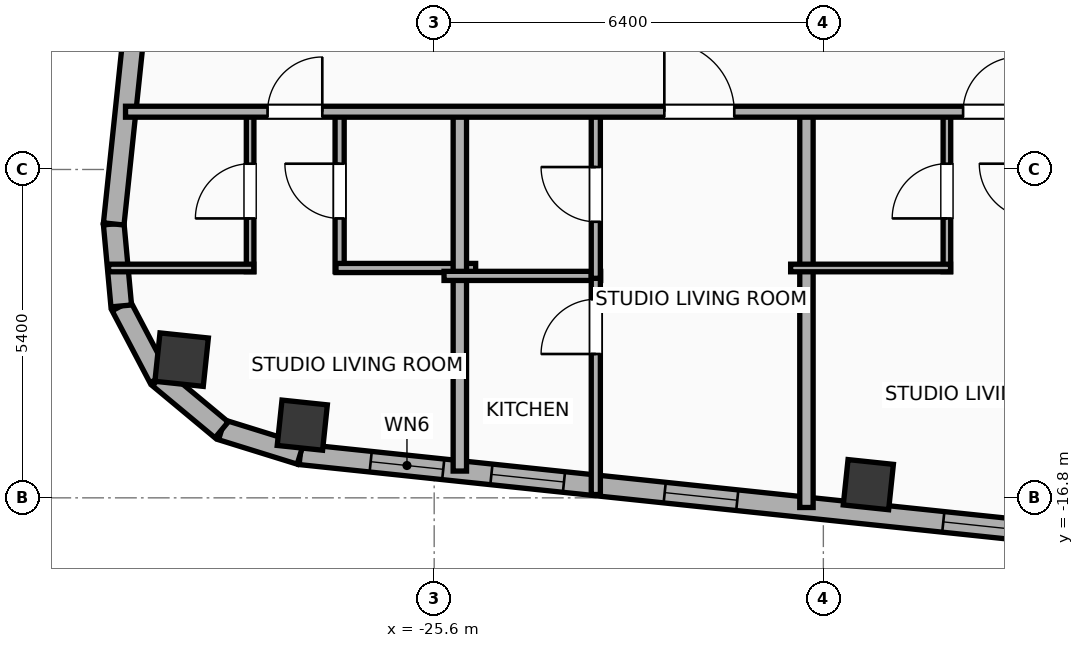
"""IFC4 building model, lengths in metres.
Left out: names, types, materials, properties, quantities, classifications, styles, units other than length and angle.
Written with IfcOpenShell. Run it as: python <this file> out.ifc"""

import sys

from ifc_helpers import new_model, si_unit, direction, frame, frame_2d, origin, origin_2d, place, context, subcontext, project, spatial, rectangle, hollow_rectangle, hollow_circle, extrude, element, fill, save


model = new_model("IFC4")
c1 = context("Model", 3, precision=1e-05, world=origin(), true_north=direction((0.0, 1.0)))
c2 = subcontext(c1, "Body", "Model", "MODEL_VIEW")
j1 = project(units=[si_unit("LENGTHUNIT", "METRE"), si_unit("PLANEANGLEUNIT", "RADIAN")], contexts=[c1])
p1 = place(None, origin())
s1 = spatial("IfcSite", under=j1, at=p1, CompositionType="ELEMENT")
p2 = place(p1, origin())
s2 = spatial("IfcBuilding", under=s1, at=p2, CompositionType="ELEMENT")
p3 = place(p2, frame((0.0, 0.0, 302.9)))
s3 = spatial("IfcBuildingStorey", under=s2, at=p3, CompositionType="ELEMENT", Elevation=302.9)
for number, where, z_axis, x_axis in (
    (1, (-27.769, -15.604, 0.0), (0.0, 0.0, 1.0), (0.995, -0.105, 0.0)),
    (2, (-18.46, -16.583, 0.0), (0.0, 0.0, 1.0), (0.995, -0.105, 0.0)),
):
    element("IfcColumn", number, at=place(p3, frame(where, z_axis=z_axis, x_axis=x_axis)), inside=s3, PredefinedType="COLUMN", context=c2, shape_type="SweptSolid", body=[
        extrude(hollow_rectangle(XDim=0.75, YDim=0.75, WallThickness=0.025, at=origin_2d()), origin(), (0.0, 0.0, 1.0), 3.9),
    ])
p4 = place(p3, frame((-29.753, -14.527, 0.0), z_axis=(0.0, 0.0, 1.0), x_axis=(0.994521895368, -0.104528463268, 0.0)))
e3 = element("IfcColumn", 3, at=p4, inside=s3, PredefinedType="COLUMN", context=c2, shape_type="SweptSolid", body=[
    extrude(hollow_circle(Radius=0.4, WallThickness=0.028, at=origin_2d()), origin(), (0.0, 0.0, 1.0), 3.9),
])
p5 = place(p3, frame((18.708, -20.972, 0.0), z_axis=(0.0, 0.0, 1.0), x_axis=(-0.994521888554, 0.104528528102, 0.0)))
e4 = element("IfcWall", 4, at=p5, inside=s3, PredefinedType="ELEMENTEDWALL", context=c2, shape_type="SweptSolid", body=[
    extrude(rectangle(XDim=46.766, YDim=0.34, at=frame_2d((23.383, 0.0))), origin(), (0.0, 0.0, 1.0), 3.635),
])
p6 = place(p5, frame((23.733, 0.0, 0.65)))
e5 = element("IfcOpeningElement", 5, at=p6, cuts=e4, PredefinedType="OPENING", context=c2, shape_type="SweptSolid", body=[
    extrude(rectangle(XDim=2.6, YDim=2.45, at=frame_2d((1.3, 1.225))), frame((0.0, 0.18, 0.0), z_axis=(0.0, -1.0, 0.0), x_axis=(1.0, 0.0, 0.0)), (0.0, 0.0, 1.0), 0.36),
])
p7 = place(p5, frame((44.402, 0.0, 0.75)))
e6 = element("IfcOpeningElement", 6, at=p7, cuts=e4, PredefinedType="OPENING", context=c2, shape_type="SweptSolid", body=[
    extrude(rectangle(XDim=1.2, YDim=2.05, at=frame_2d((0.6, 1.025))), frame((0.0, 0.18, 0.0), z_axis=(0.0, -1.0, 0.0), x_axis=(1.0, 0.0, 0.0)), (0.0, 0.0, 1.0), 0.36),
])
p8 = place(p5, frame((39.54, 0.0, 0.75)))
e7 = element("IfcOpeningElement", 7, at=p8, cuts=e4, PredefinedType="OPENING", context=c2, shape_type="SweptSolid", body=[
    extrude(rectangle(XDim=1.2, YDim=2.05, at=frame_2d((0.6, 1.025))), frame((0.0, 0.18, 0.0), z_axis=(0.0, -1.0, 0.0), x_axis=(1.0, 0.0, 0.0)), (0.0, 0.0, 1.0), 0.36),
])
p9 = place(p5, frame((42.406, 0.0, 0.75)))
e8 = element("IfcOpeningElement", 8, at=p9, cuts=e4, PredefinedType="OPENING", context=c2, shape_type="SweptSolid", body=[
    extrude(rectangle(XDim=1.2, YDim=2.05, at=frame_2d((0.6, 1.025))), frame((0.0, 0.18, 0.0), z_axis=(0.0, -1.0, 0.0), x_axis=(1.0, 0.0, 0.0)), (0.0, 0.0, 1.0), 0.36),
])
p10 = place(p5, frame((34.933, 0.0, 0.75)))
e9 = element("IfcOpeningElement", 9, at=p10, cuts=e4, PredefinedType="OPENING", context=c2, shape_type="SweptSolid", body=[
    extrude(rectangle(XDim=1.2, YDim=2.05, at=frame_2d((0.6, 1.025))), frame((0.0, 0.18, 0.0), z_axis=(0.0, -1.0, 0.0), x_axis=(1.0, 0.0, 0.0)), (0.0, 0.0, 1.0), 0.36),
])
p11 = place(p5, frame((28.631, 0.0, 0.75)))
e10 = element("IfcOpeningElement", 10, at=p11, cuts=e4, PredefinedType="OPENING", context=c2, shape_type="SweptSolid", body=[
    extrude(rectangle(XDim=1.2, YDim=2.05, at=frame_2d((0.6, 1.025))), frame((0.0, 0.18, 0.0), z_axis=(0.0, -1.0, 0.0), x_axis=(1.0, 0.0, 0.0)), (0.0, 0.0, 1.0), 0.36),
])
p12 = place(p5, frame((30.896, 0.0, 0.75)))
e11 = element("IfcOpeningElement", 11, at=p12, cuts=e4, PredefinedType="OPENING", context=c2, shape_type="SweptSolid", body=[
    extrude(rectangle(XDim=1.2, YDim=2.05, at=frame_2d((0.6, 1.025))), frame((0.0, 0.18, 0.0), z_axis=(0.0, -1.0, 0.0), x_axis=(1.0, 0.0, 0.0)), (0.0, 0.0, 1.0), 0.36),
])
p13 = place(p5, frame((7.501, 0.0, 0.75)))
e12 = element("IfcOpeningElement", 12, at=p13, cuts=e4, PredefinedType="OPENING", context=c2, shape_type="SweptSolid", body=[
    extrude(rectangle(XDim=1.2, YDim=2.05, at=frame_2d((0.6, 1.025))), frame((0.0, 0.18, 0.0), z_axis=(0.0, -1.0, 0.0), x_axis=(1.0, 0.0, 0.0)), (0.0, 0.0, 1.0), 0.36),
])
p14 = place(p5, frame((4.159, 0.0, 0.75)))
e13 = element("IfcOpeningElement", 13, at=p14, cuts=e4, PredefinedType="OPENING", context=c2, shape_type="SweptSolid", body=[
    extrude(rectangle(XDim=1.2, YDim=2.05, at=frame_2d((0.6, 1.025))), frame((0.0, 0.18, 0.0), z_axis=(0.0, -1.0, 0.0), x_axis=(1.0, 0.0, 0.0)), (0.0, 0.0, 1.0), 0.36),
])
p15 = place(p5, frame((1.369, 0.0, 0.75)))
e14 = element("IfcOpeningElement", 14, at=p15, cuts=e4, PredefinedType="OPENING", context=c2, shape_type="SweptSolid", body=[
    extrude(rectangle(XDim=1.2, YDim=2.05, at=frame_2d((0.6, 1.025))), frame((0.0, 0.18, 0.0), z_axis=(0.0, -1.0, 0.0), x_axis=(1.0, 0.0, 0.0)), (0.0, 0.0, 1.0), 0.36),
])
p16 = place(p5, frame((20.254, 0.0, 0.75)))
e15 = element("IfcOpeningElement", 15, at=p16, cuts=e4, PredefinedType="OPENING", context=c2, shape_type="SweptSolid", body=[
    extrude(rectangle(XDim=1.2, YDim=2.05, at=frame_2d((0.6, 1.025))), frame((0.0, 0.18, 0.0), z_axis=(0.0, -1.0, 0.0), x_axis=(1.0, 0.0, 0.0)), (0.0, 0.0, 1.0), 0.36),
])
p17 = place(p5, frame((16.172, 0.0, 0.75)))
e16 = element("IfcOpeningElement", 16, at=p17, cuts=e4, PredefinedType="OPENING", context=c2, shape_type="SweptSolid", body=[
    extrude(rectangle(XDim=1.2, YDim=2.05, at=frame_2d((0.6, 1.025))), frame((0.0, 0.18, 0.0), z_axis=(0.0, -1.0, 0.0), x_axis=(1.0, 0.0, 0.0)), (0.0, 0.0, 1.0), 0.36),
])
p18 = place(p5, frame((12.11, 0.0, 0.75)))
e17 = element("IfcOpeningElement", 17, at=p18, cuts=e4, PredefinedType="OPENING", context=c2, shape_type="SweptSolid", body=[
    extrude(rectangle(XDim=1.2, YDim=2.05, at=frame_2d((0.6, 1.025))), frame((0.0, 0.18, 0.0), z_axis=(0.0, -1.0, 0.0), x_axis=(1.0, 0.0, 0.0)), (0.0, 0.0, 1.0), 0.36),
])
p19 = place(p3, frame((-27.802, -16.084, 0.0), z_axis=(0.0, 0.0, 1.0), x_axis=(-0.955007802701, 0.296580674994, 0.0)))
e18 = element("IfcWall", 18, at=p19, inside=s3, PredefinedType="ELEMENTEDWALL", context=c2, shape_type="SweptSolid", body=[
    extrude(rectangle(XDim=1.354, YDim=0.34, at=frame_2d((0.677, 0.0))), origin(), (0.0, 0.0, 1.0), 3.635),
])
p20 = place(p3, frame((-29.096, -15.682, 0.0), z_axis=(0.0, 0.0, 1.0), x_axis=(-0.768864427906, 0.639411832469, 0.0)))
e19 = element("IfcWall", 19, at=p20, inside=s3, PredefinedType="ELEMENTEDWALL", context=c2, shape_type="SweptSolid", body=[
    extrude(rectangle(XDim=1.337, YDim=0.34, at=frame_2d((0.668, 0.0))), origin(), (0.0, 0.0, 1.0), 3.635),
])
p21 = place(p3, frame((-30.124, -14.827, 0.0), z_axis=(0.0, 0.0, 1.0), x_axis=(-0.465528132217, 0.885033083062, 0.0)))
e20 = element("IfcWall", 20, at=p21, inside=s3, PredefinedType="ELEMENTEDWALL", context=c2, shape_type="SweptSolid", body=[
    extrude(rectangle(XDim=1.337, YDim=0.34, at=frame_2d((0.668, 0.0))), origin(), (0.0, 0.0, 1.0), 3.635),
])
p22 = place(p3, frame((-30.746, -13.644, 0.0), z_axis=(0.0, 0.0, 1.0), x_axis=(-0.091592370975, 0.995796584438, 0.0)))
e21 = element("IfcWall", 21, at=p22, inside=s3, PredefinedType="ELEMENTEDWALL", context=c2, shape_type="SweptSolid", body=[
    extrude(rectangle(XDim=1.354, YDim=0.34, at=frame_2d((0.677, 0.0))), origin(), (0.0, 0.0, 1.0), 3.635),
])
p23 = place(p3, frame((-30.87, -12.296, 0.0), z_axis=(0.0, 0.0, 1.0), x_axis=(0.104533282919, 0.994521388791, 0.0)))
e22 = element("IfcWall", 22, at=p23, inside=s3, PredefinedType="ELEMENTEDWALL", context=c2, shape_type="SweptSolid", body=[
    extrude(rectangle(XDim=30.366, YDim=0.34, at=frame_2d((15.183, 0.0))), origin(), (0.0, 0.0, 1.0), 3.635),
])
p24 = place(p23, frame((5.442, 0.0, 0.65)))
e23 = element("IfcOpeningElement", 23, at=p24, cuts=e22, PredefinedType="OPENING", context=c2, shape_type="SweptSolid", body=[
    extrude(rectangle(XDim=2.6, YDim=2.45, at=frame_2d((1.3, 1.225))), frame((0.0, 0.18, 0.0), z_axis=(0.0, -1.0, 0.0), x_axis=(1.0, 0.0, 0.0)), (0.0, 0.0, 1.0), 0.36),
])
p25 = place(p23, frame((26.861, 0.0, 0.75)))
e24 = element("IfcOpeningElement", 24, at=p25, cuts=e22, PredefinedType="OPENING", context=c2, shape_type="SweptSolid", body=[
    extrude(rectangle(XDim=1.2, YDim=2.05, at=frame_2d((0.6, 1.025))), frame((0.0, 0.18, 0.0), z_axis=(0.0, -1.0, 0.0), x_axis=(1.0, 0.0, 0.0)), (0.0, 0.0, 1.0), 0.36),
])
p26 = place(p23, frame((16.311, 0.0, 0.75)))
e25 = element("IfcOpeningElement", 25, at=p26, cuts=e22, PredefinedType="OPENING", context=c2, shape_type="SweptSolid", body=[
    extrude(rectangle(XDim=1.2, YDim=2.05, at=frame_2d((0.6, 1.025))), frame((0.0, 0.18, 0.0), z_axis=(0.0, -1.0, 0.0), x_axis=(1.0, 0.0, 0.0)), (0.0, 0.0, 1.0), 0.36),
])
p27 = place(p3, frame((-28.627, -13.08, 0.0), z_axis=(0.0, 0.0, 1.0), x_axis=(0.0, 1.0, 0.0)))
e26 = element("IfcWall", 26, at=p27, inside=s3, PredefinedType="PARTITIONING", context=c2, shape_type="SweptSolid", body=[
    extrude(rectangle(XDim=2.65, YDim=0.125, at=frame_2d((1.325, 0.0))), origin(), (0.0, 0.0, 1.0), 3.635),
])
p28 = place(p27, frame((0.875, 0.0, 0.0)))
e27 = element("IfcOpeningElement", 27, at=p28, cuts=e26, PredefinedType="OPENING", context=c2, shape_type="SweptSolid", body=[
    extrude(rectangle(XDim=0.9, YDim=2.05, at=frame_2d((0.45, 1.025))), frame((0.0, 0.073, 0.0), z_axis=(0.0, -1.0, 0.0), x_axis=(1.0, 0.0, 0.0)), (0.0, 0.0, 1.0), 0.145),
])
p29 = place(p3, frame((-27.155, -13.08, 0.0), z_axis=(0.0, 0.0, 1.0), x_axis=(0.0, 1.0, 0.0)))
e28 = element("IfcWall", 28, at=p29, inside=s3, PredefinedType="PLUMBINGWALL", context=c2, shape_type="SweptSolid", body=[
    extrude(rectangle(XDim=2.65, YDim=0.15, at=frame_2d((1.325, 0.0))), origin(), (0.0, 0.0, 1.0), 3.635),
])
p30 = place(p29, frame((0.875, 0.0, 0.0)))
e29 = element("IfcOpeningElement", 29, at=p30, cuts=e28, PredefinedType="OPENING", context=c2, shape_type="SweptSolid", body=[
    extrude(rectangle(XDim=0.9, YDim=2.05, at=frame_2d((0.45, 1.025))), frame((0.0, 0.085, 0.0), z_axis=(0.0, -1.0, 0.0), x_axis=(1.0, 0.0, 0.0)), (0.0, 0.0, 1.0), 0.17),
])
p31 = place(p3, frame((-30.954, -13.02, 0.0), z_axis=(0.0, 0.0, 1.0), x_axis=(1.0, 0.0, 0.0)))
e30 = element("IfcWall", 30, at=p31, inside=s3, PredefinedType="PARTITIONING", context=c2, shape_type="SweptSolid", body=[
    extrude(rectangle(XDim=2.387, YDim=0.125, at=frame_2d((1.194, 0.0))), origin(), (0.0, 0.0, 1.0), 3.635),
])
p32 = place(p3, frame((-27.215, -13.02, 0.0), z_axis=(0.0, 0.0, 1.0), x_axis=(1.0, 0.0, 0.0)))
e31 = element("IfcWall", 31, at=p32, inside=s3, PredefinedType="PLUMBINGWALL", context=c2, shape_type="SweptSolid", body=[
    extrude(rectangle(XDim=2.297, YDim=0.15, at=frame_2d((1.148, 0.0))), origin(), (0.0, 0.0, 1.0), 3.635),
])
p33 = place(p3, frame((-25.178, -16.36, 0.0), z_axis=(0.0, 0.0, 1.0), x_axis=(0.0, 1.0, 0.0)))
e32 = element("IfcWall", 32, at=p33, inside=s3, PredefinedType="PARTITIONING", context=c2, shape_type="SweptSolid", body=[
    extrude(rectangle(XDim=5.99, YDim=0.22, at=frame_2d((2.995, 0.0))), origin(), (0.0, 0.0, 1.0), 3.635),
])
p34 = place(p3, frame((-25.438, -13.15, 0.0), z_axis=(0.0, 0.0, 1.0), x_axis=(1.0, 0.0, 0.0)))
e33 = element("IfcWall", 33, at=p34, inside=s3, PredefinedType="PLUMBINGWALL", context=c2, shape_type="SweptSolid", body=[
    extrude(rectangle(XDim=2.576, YDim=0.15, at=frame_2d((1.288, 0.0))), origin(), (0.0, 0.0, 1.0), 3.635),
])
p35 = place(p3, frame((-22.942, -16.745, 0.0), z_axis=(0.0, 0.0, 1.0), x_axis=(0.0, 1.0, 0.0)))
e34 = element("IfcWall", 34, at=p35, inside=s3, PredefinedType="PLUMBINGWALL", context=c2, shape_type="SweptSolid", body=[
    extrude(rectangle(XDim=3.635, YDim=0.15, at=frame_2d((1.818, 0.0))), origin(), (0.0, 0.0, 1.0), 3.635),
])
p36 = place(p35, frame((2.311, 0.0, 0.0)))
e35 = element("IfcOpeningElement", 35, at=p36, cuts=e34, PredefinedType="OPENING", context=c2, shape_type="SweptSolid", body=[
    extrude(rectangle(XDim=0.9, YDim=2.05, at=frame_2d((0.45, 1.025))), frame((0.0, 0.085, 0.0), z_axis=(0.0, -1.0, 0.0), x_axis=(1.0, 0.0, 0.0)), (0.0, 0.0, 1.0), 0.17),
])
p37 = place(p3, frame((-22.942, -13.19, 0.0), z_axis=(0.0, 0.0, 1.0), x_axis=(0.0, 1.0, 0.0)))
e36 = element("IfcWall", 36, at=p37, inside=s3, PredefinedType="PLUMBINGWALL", context=c2, shape_type="SweptSolid", body=[
    extrude(rectangle(XDim=2.76, YDim=0.15, at=frame_2d((1.38, 0.0))), origin(), (0.0, 0.0, 1.0), 3.635),
])
p38 = place(p37, frame((0.93, 0.0, 0.0)))
e37 = element("IfcOpeningElement", 37, at=p38, cuts=e36, PredefinedType="OPENING", context=c2, shape_type="SweptSolid", body=[
    extrude(rectangle(XDim=0.9, YDim=2.05, at=frame_2d((0.45, 1.025))), frame((0.0, 0.085, 0.0), z_axis=(0.0, -1.0, 0.0), x_axis=(1.0, 0.0, 0.0)), (0.0, 0.0, 1.0), 0.17),
])
p39 = place(p3, frame((-19.478, -16.959, 0.0), z_axis=(0.0, 0.0, 1.0), x_axis=(0.0, 1.0, 0.0)))
e38 = element("IfcWall", 38, at=p39, inside=s3, PredefinedType="PARTITIONING", context=c2, shape_type="SweptSolid", body=[
    extrude(rectangle(XDim=6.589, YDim=0.22, at=frame_2d((3.294, 0.0))), origin(), (0.0, 0.0, 1.0), 3.635),
])
p40 = place(p3, frame((-17.168, -13.08, 0.0), z_axis=(0.0, 0.0, 1.0), x_axis=(0.0, 1.0, 0.0)))
e39 = element("IfcWall", 39, at=p40, inside=s3, PredefinedType="PARTITIONING", context=c2, shape_type="SweptSolid", body=[
    extrude(rectangle(XDim=2.65, YDim=0.125, at=frame_2d((1.325, 0.0))), origin(), (0.0, 0.0, 1.0), 3.635),
])
p41 = place(p40, frame((0.875, 0.0, 0.0)))
e40 = element("IfcOpeningElement", 40, at=p41, cuts=e39, PredefinedType="OPENING", context=c2, shape_type="SweptSolid", body=[
    extrude(rectangle(XDim=0.9, YDim=2.05, at=frame_2d((0.45, 1.025))), frame((0.0, 0.073, 0.0), z_axis=(0.0, -1.0, 0.0), x_axis=(1.0, 0.0, 0.0)), (0.0, 0.0, 1.0), 0.145),
])
p42 = place(p3, frame((-19.738, -13.02, 0.0), z_axis=(0.0, 0.0, 1.0), x_axis=(1.0, 0.0, 0.0)))
e41 = element("IfcWall", 41, at=p42, inside=s3, PredefinedType="PARTITIONING", context=c2, shape_type="SweptSolid", body=[
    extrude(rectangle(XDim=2.63, YDim=0.125, at=frame_2d((1.315, 0.0))), origin(), (0.0, 0.0, 1.0), 3.635),
])
p43 = place(p3, frame((-30.676, -10.45, 0.0), z_axis=(0.0, 0.0, 1.0), x_axis=(1.0, 0.0, 0.0)))
e42 = element("IfcWall", 42, at=p43, inside=s3, PredefinedType="PARTITIONING", context=c2, shape_type="SweptSolid", body=[
    extrude(rectangle(XDim=22.596, YDim=0.18, at=frame_2d((11.298, 0.0))), origin(), (0.0, 0.0, 1.0), 3.635),
])
p44 = place(p43, frame((2.336, 0.0, 0.0)))
e43 = element("IfcOpeningElement", 43, at=p44, cuts=e42, PredefinedType="OPENING", context=c2, shape_type="SweptSolid", body=[
    extrude(rectangle(XDim=0.9, YDim=2.05, at=frame_2d((0.45, 1.025))), frame((0.0, 0.1, 0.0), z_axis=(0.0, -1.0, 0.0), x_axis=(1.0, 0.0, 0.0)), (0.0, 0.0, 1.0), 0.2),
])
p45 = place(p43, frame((8.861, 0.0, 0.0)))
e44 = element("IfcOpeningElement", 44, at=p45, cuts=e42, PredefinedType="OPENING", context=c2, shape_type="SweptSolid", body=[
    extrude(rectangle(XDim=1.15, YDim=2.05, at=frame_2d((0.575, 1.025))), frame((0.0, 0.1, 0.0), z_axis=(0.0, -1.0, 0.0), x_axis=(1.0, 0.0, 0.0)), (0.0, 0.0, 1.0), 0.2),
])
p46 = place(p43, frame((13.774, 0.0, 0.0)))
e45 = element("IfcOpeningElement", 45, at=p46, cuts=e42, PredefinedType="OPENING", context=c2, shape_type="SweptSolid", body=[
    extrude(rectangle(XDim=0.9, YDim=2.05, at=frame_2d((0.45, 1.025))), frame((0.0, 0.1, 0.0), z_axis=(0.0, -1.0, 0.0), x_axis=(1.0, 0.0, 0.0)), (0.0, 0.0, 1.0), 0.2),
])
p47 = place(p43, frame((20.306, 0.0, 0.0)))
e46 = element("IfcOpeningElement", 46, at=p47, cuts=e42, PredefinedType="OPENING", context=c2, shape_type="SweptSolid", body=[
    extrude(rectangle(XDim=1.15, YDim=2.05, at=frame_2d((0.575, 1.025))), frame((0.0, 0.1, 0.0), z_axis=(0.0, -1.0, 0.0), x_axis=(1.0, 0.0, 0.0)), (0.0, 0.0, 1.0), 0.2),
])
p48 = place(p7, origin())
e47 = element("IfcWindow", 47, at=p48, inside=s3, PartitioningType="SINGLE_PANEL", PredefinedType="WINDOW", context=c2, shape_type="SweptSolid", body=[
    extrude(rectangle(XDim=1.2, YDim=2.05, at=frame_2d((0.6, 1.025))), frame((0.0, 0.03, 0.0), z_axis=(0.0, -1.0, 0.0), x_axis=(1.0, 0.0, 0.0)), (0.0, 0.0, 1.0), 0.06),
])
fill(e6, e47)
p49 = place(p8, origin())
e48 = element("IfcWindow", 48, at=p49, inside=s3, PartitioningType="SINGLE_PANEL", PredefinedType="WINDOW", context=c2, shape_type="SweptSolid", body=[
    extrude(rectangle(XDim=1.2, YDim=2.05, at=frame_2d((0.6, 1.025))), frame((0.0, 0.03, 0.0), z_axis=(0.0, -1.0, 0.0), x_axis=(1.0, 0.0, 0.0)), (0.0, 0.0, 1.0), 0.06),
])
fill(e7, e48)
p50 = place(p9, origin())
e49 = element("IfcWindow", 49, at=p50, inside=s3, PartitioningType="SINGLE_PANEL", PredefinedType="WINDOW", context=c2, shape_type="SweptSolid", body=[
    extrude(rectangle(XDim=1.2, YDim=2.05, at=frame_2d((0.6, 1.025))), frame((0.0, 0.03, 0.0), z_axis=(0.0, -1.0, 0.0), x_axis=(1.0, 0.0, 0.0)), (0.0, 0.0, 1.0), 0.06),
])
fill(e8, e49)
p51 = place(p10, origin())
e50 = element("IfcWindow", 50, at=p51, inside=s3, PartitioningType="SINGLE_PANEL", PredefinedType="WINDOW", context=c2, shape_type="SweptSolid", body=[
    extrude(rectangle(XDim=1.2, YDim=2.05, at=frame_2d((0.6, 1.025))), frame((0.0, 0.03, 0.0), z_axis=(0.0, -1.0, 0.0), x_axis=(1.0, 0.0, 0.0)), (0.0, 0.0, 1.0), 0.06),
])
fill(e9, e50)
p52 = place(p28, origin())
e51 = element("IfcDoor", 51, at=p52, inside=s3, OperationType="SINGLE_SWING_LEFT", PredefinedType="DOOR", context=c2, shape_type="SweptSolid", body=[
    extrude(rectangle(XDim=0.9, YDim=2.05, at=frame_2d((0.45, 1.025))), frame((0.0, 0.025, 0.0), z_axis=(0.0, -1.0, 0.0), x_axis=(1.0, 0.0, 0.0)), (0.0, 0.0, 1.0), 0.05),
])
fill(e27, e51)
p53 = place(p30, origin())
e52 = element("IfcDoor", 52, at=p53, inside=s3, OperationType="SINGLE_SWING_RIGHT", PredefinedType="DOOR", context=c2, shape_type="SweptSolid", body=[
    extrude(rectangle(XDim=0.9, YDim=2.05, at=frame_2d((0.45, 1.025))), frame((0.0, 0.025, 0.0), z_axis=(0.0, -1.0, 0.0), x_axis=(1.0, 0.0, 0.0)), (0.0, 0.0, 1.0), 0.05),
])
fill(e29, e52)
p54 = place(p36, origin())
e53 = element("IfcDoor", 53, at=p54, inside=s3, OperationType="SINGLE_SWING_LEFT", PredefinedType="DOOR", context=c2, shape_type="SweptSolid", body=[
    extrude(rectangle(XDim=0.9, YDim=2.05, at=frame_2d((0.45, 1.025))), frame((0.0, 0.025, 0.0), z_axis=(0.0, -1.0, 0.0), x_axis=(1.0, 0.0, 0.0)), (0.0, 0.0, 1.0), 0.05),
])
fill(e35, e53)
p55 = place(p38, origin())
e54 = element("IfcDoor", 54, at=p55, inside=s3, OperationType="SINGLE_SWING_RIGHT", PredefinedType="DOOR", context=c2, shape_type="SweptSolid", body=[
    extrude(rectangle(XDim=0.9, YDim=2.05, at=frame_2d((0.45, 1.025))), frame((0.0, 0.025, 0.0), z_axis=(0.0, -1.0, 0.0), x_axis=(1.0, 0.0, 0.0)), (0.0, 0.0, 1.0), 0.05),
])
fill(e37, e54)
p56 = place(p41, origin())
e55 = element("IfcDoor", 55, at=p56, inside=s3, OperationType="SINGLE_SWING_LEFT", PredefinedType="DOOR", context=c2, shape_type="SweptSolid", body=[
    extrude(rectangle(XDim=0.9, YDim=2.05, at=frame_2d((0.45, 1.025))), frame((0.0, 0.025, 0.0), z_axis=(0.0, -1.0, 0.0), x_axis=(1.0, 0.0, 0.0)), (0.0, 0.0, 1.0), 0.05),
])
fill(e40, e55)
p57 = place(p44, origin())
e56 = element("IfcDoor", 56, at=p57, inside=s3, OperationType="SINGLE_SWING_RIGHT", PredefinedType="DOOR", context=c2, shape_type="SweptSolid", body=[
    extrude(rectangle(XDim=0.9, YDim=2.05, at=frame_2d((0.45, 1.025))), frame((0.0, 0.025, 0.0), z_axis=(0.0, -1.0, 0.0), x_axis=(1.0, 0.0, 0.0)), (0.0, 0.0, 1.0), 0.05),
])
fill(e43, e56)
p58 = place(p45, origin())
e57 = element("IfcDoor", 57, at=p58, inside=s3, OperationType="SINGLE_SWING_LEFT", PredefinedType="DOOR", context=c2, shape_type="SweptSolid", body=[
    extrude(rectangle(XDim=1.15, YDim=2.05, at=frame_2d((0.575, 1.025))), frame((0.0, 0.025, 0.0), z_axis=(0.0, -1.0, 0.0), x_axis=(1.0, 0.0, 0.0)), (0.0, 0.0, 1.0), 0.05),
])
fill(e44, e57)
p59 = place(p46, origin())
e58 = element("IfcDoor", 58, at=p59, inside=s3, OperationType="SINGLE_SWING_RIGHT", PredefinedType="DOOR", context=c2, shape_type="SweptSolid", body=[
    extrude(rectangle(XDim=0.9, YDim=2.05, at=frame_2d((0.45, 1.025))), frame((0.0, 0.025, 0.0), z_axis=(0.0, -1.0, 0.0), x_axis=(1.0, 0.0, 0.0)), (0.0, 0.0, 1.0), 0.05),
])
fill(e45, e58)
save(model, sys.argv[1])
